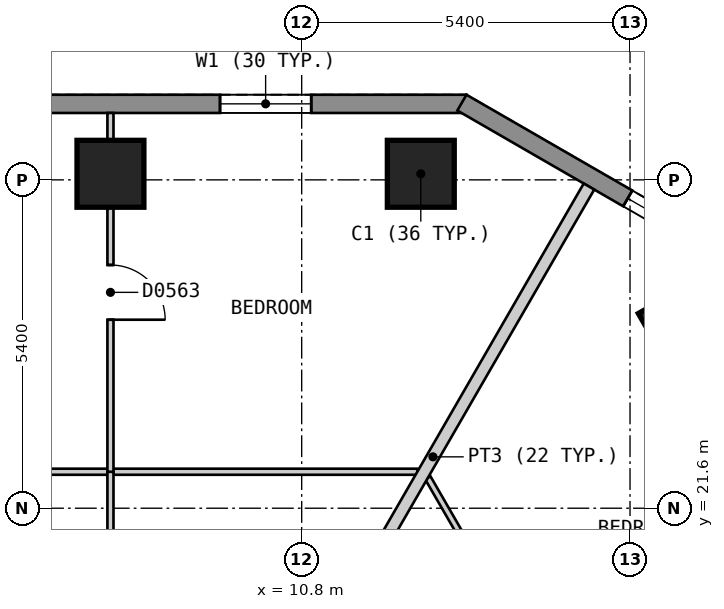
"""IFC4 building model, lengths in metres.
Left out: names, types, materials, properties, quantities, classifications, styles, units other than length and angle.
Written with IfcOpenShell. Run it as: python <this file> out.ifc"""

import sys

from ifc_helpers import new_model, si_unit, direction, frame, frame_2d, origin, origin_2d, place, context, subcontext, project, spatial, polyline, rectangle, outline, extrude, element, fill, save


model = new_model("IFC4")
c1 = context("Model", 3, precision=1e-05, world=origin(), true_north=direction((0.0, 1.0)))
c2 = subcontext(c1, "Body", "Model", "MODEL_VIEW")
j1 = project(units=[si_unit("LENGTHUNIT", "METRE"), si_unit("PLANEANGLEUNIT", "RADIAN")], contexts=[c1])
p1 = place(None, origin())
s1 = spatial("IfcSite", under=j1, at=p1, CompositionType="ELEMENT")
p2 = place(p1, origin())
s2 = spatial("IfcBuilding", under=s1, at=p2, CompositionType="ELEMENT")
p3 = place(p2, frame((0.0, 0.0, 44.4)))
s3 = spatial("IfcBuildingStorey", under=s2, at=p3, CompositionType="ELEMENT", Elevation=44.4)
for number, where, z_axis, x_axis in (
    (1, (12.759, 27.1, 0.0), (0.0, 0.0, 1.0), (-1.0, 0.0, 0.0)),
    (2, (7.655, 27.1, 0.0), (0.0, 0.0, 1.0), (-1.0, 0.0, 0.0)),
    (3, (17.089, 24.601, 0.0), (0.0, 0.0, 1.0), (-0.5, 0.866, 0.0)),
):
    element("IfcColumn", number, at=place(p3, frame(where, z_axis=z_axis, x_axis=x_axis)), inside=s3, PredefinedType="COLUMN", context=c2, shape_type="SweptSolid", body=[
        extrude(rectangle(XDim=1.1, YDim=1.1, at=origin_2d()), origin(), (0.0, 0.0, 1.0), 3.0),
    ])
p4 = place(p3, frame((13.51, 28.25, 0.0), z_axis=(0.0, 0.0, 1.0), x_axis=(-1.0, 0.0, 0.0)))
e4 = element("IfcWall", 4, at=p4, inside=s3, PredefinedType="SOLIDWALL", context=c2, shape_type="SweptSolid", body=[
    extrude(outline(polyline([(0.0, -0.15), (27.02, -0.15), (26.94, 0.15), (0.08, 0.15), (0.0, -0.15)])), origin(), (0.0, 0.0, 1.0), 2.7),
])
p5 = place(p4, frame((2.553, 0.0, 0.15)))
e5 = element("IfcOpeningElement", 5, at=p5, cuts=e4, PredefinedType="OPENING", context=c2, shape_type="SweptSolid", body=[
    extrude(rectangle(XDim=1.5, YDim=2.1, at=frame_2d((0.75, 1.05))), frame((0.0, 0.16, 0.0), z_axis=(0.0, -1.0, 0.0), x_axis=(1.0, 0.0, 0.0)), (0.0, 0.0, 1.0), 0.32),
])
p6 = place(p4, frame((7.657, 0.0, 0.15)))
e6 = element("IfcOpeningElement", 6, at=p6, cuts=e4, PredefinedType="OPENING", context=c2, shape_type="SweptSolid", body=[
    extrude(rectangle(XDim=1.5, YDim=2.1, at=frame_2d((0.75, 1.05))), frame((0.0, 0.16, 0.0), z_axis=(0.0, -1.0, 0.0), x_axis=(1.0, 0.0, 0.0)), (0.0, 0.0, 1.0), 0.32),
])
p7 = place(p4, frame((12.761, 0.0, 0.15)))
e7 = element("IfcOpeningElement", 7, at=p7, cuts=e4, PredefinedType="OPENING", context=c2, shape_type="SweptSolid", body=[
    extrude(rectangle(XDim=1.5, YDim=2.1, at=frame_2d((0.75, 1.05))), frame((0.0, 0.16, 0.0), z_axis=(0.0, -1.0, 0.0), x_axis=(1.0, 0.0, 0.0)), (0.0, 0.0, 1.0), 0.32),
])
p8 = place(p4, frame((17.865, 0.0, 0.15)))
e8 = element("IfcOpeningElement", 8, at=p8, cuts=e4, PredefinedType="OPENING", context=c2, shape_type="SweptSolid", body=[
    extrude(rectangle(XDim=1.5, YDim=2.1, at=frame_2d((0.75, 1.05))), frame((0.0, 0.16, 0.0), z_axis=(0.0, -1.0, 0.0), x_axis=(1.0, 0.0, 0.0)), (0.0, 0.0, 1.0), 0.32),
])
p9 = place(p4, frame((22.969, 0.0, 0.15)))
e9 = element("IfcOpeningElement", 9, at=p9, cuts=e4, PredefinedType="OPENING", context=c2, shape_type="SweptSolid", body=[
    extrude(rectangle(XDim=1.5, YDim=2.1, at=frame_2d((0.75, 1.05))), frame((0.0, 0.16, 0.0), z_axis=(0.0, -1.0, 0.0), x_axis=(1.0, 0.0, 0.0)), (0.0, 0.0, 1.0), 0.32),
])
p10 = place(p3, frame((17.765, 25.77, 0.0), z_axis=(0.0, 0.0, 1.0), x_axis=(-0.866010750942, 0.50002537861, 0.0)))
e10 = element("IfcWall", 10, at=p10, inside=s3, PredefinedType="SOLIDWALL", context=c2, shape_type="SweptSolid", body=[
    extrude(outline(polyline([(0.0, -0.15), (5.0, -0.15), (4.919, 0.15), (0.08, 0.15), (0.0, -0.15)])), origin(), (0.0, 0.0, 1.0), 2.7),
])
p11 = place(p10, frame((0.65, 0.0, 0.15)))
e11 = element("IfcOpeningElement", 11, at=p11, cuts=e10, PredefinedType="OPENING", context=c2, shape_type="SweptSolid", body=[
    extrude(rectangle(XDim=1.2, YDim=2.1, at=frame_2d((0.6, 1.05))), frame((0.0, 0.16, 0.0), z_axis=(0.0, -1.0, 0.0), x_axis=(1.0, 0.0, 0.0)), (0.0, 0.0, 1.0), 0.32),
])
p12 = place(p3, frame((12.875, 22.1, 0.0), z_axis=(0.0, 0.0, 1.0), x_axis=(0.499994897061, -0.866028349948, 0.0)))
e12 = element("IfcWall", 12, at=p12, inside=s3, PredefinedType="PARTITIONING", context=c2, shape_type="SweptSolid", body=[
    extrude(rectangle(XDim=15.152, YDim=0.1, at=frame_2d((7.576, 0.0))), origin(), (0.0, 0.0, 1.0), 2.7),
])
p13 = place(p12, frame((7.146, 0.0, 0.0)))
e13 = element("IfcOpeningElement", 13, at=p13, cuts=e12, PredefinedType="OPENING", context=c2, shape_type="SweptSolid", body=[
    extrude(rectangle(XDim=0.9, YDim=2.1, at=frame_2d((0.45, 1.05))), frame((0.0, 0.06, 0.0), z_axis=(0.0, -1.0, 0.0), x_axis=(1.0, 0.0, 0.0)), (0.0, 0.0, 1.0), 0.12),
])
p14 = place(p3, frame((-2.453, 22.2, 0.0), z_axis=(0.0, 0.0, 1.0), x_axis=(1.0, 0.0, 0.0)))
e14 = element("IfcWall", 14, at=p14, inside=s3, PredefinedType="PARTITIONING", context=c2, shape_type="SweptSolid", body=[
    extrude(rectangle(XDim=15.155, YDim=0.1, at=frame_2d((7.577, 0.0))), origin(), (0.0, 0.0, 1.0), 2.7),
])
p15 = place(p14, frame((7.106, 0.0, 0.0)))
e15 = element("IfcOpeningElement", 15, at=p15, cuts=e14, PredefinedType="OPENING", context=c2, shape_type="SweptSolid", body=[
    extrude(rectangle(XDim=0.9, YDim=2.1, at=frame_2d((0.45, 1.05))), frame((0.0, 0.06, 0.0), z_axis=(0.0, -1.0, 0.0), x_axis=(1.0, 0.0, 0.0)), (0.0, 0.0, 1.0), 0.12),
])
p16 = place(p3, frame((7.655, 18.1, 0.0), z_axis=(0.0, 0.0, 1.0), x_axis=(0.0, 1.0, 0.0)))
e16 = element("IfcWall", 16, at=p16, inside=s3, PredefinedType="PARTITIONING", context=c2, shape_type="SweptSolid", body=[
    extrude(rectangle(XDim=4.1, YDim=0.1, at=frame_2d((2.05, 0.0))), origin(), (0.0, 0.0, 1.0), 2.7),
])
p17 = place(p16, frame((1.6, 0.0, 0.0)))
e17 = element("IfcOpeningElement", 17, at=p17, cuts=e16, PredefinedType="OPENING", context=c2, shape_type="SweptSolid", body=[
    extrude(rectangle(XDim=0.8, YDim=2.1, at=frame_2d((0.4, 1.05))), frame((0.0, 0.06, 0.0), z_axis=(0.0, -1.0, 0.0), x_axis=(1.0, 0.0, 0.0)), (0.0, 0.0, 1.0), 0.12),
])
p18 = place(p3, frame((10.393, 18.0, 0.0), z_axis=(0.0, 0.0, 1.0), x_axis=(0.499945497007, 0.866056868816, 0.0)))
e18 = element("IfcWall", 18, at=p18, inside=s3, PredefinedType="PARTITIONING", context=c2, shape_type="SweptSolid", body=[
    extrude(rectangle(XDim=10.265, YDim=0.2, at=frame_2d((5.132, 0.0))), origin(), (0.0, 0.0, 1.0), 2.7),
])
p19 = place(p3, frame((7.655, 22.2, 0.0), z_axis=(0.0, 0.0, 1.0), x_axis=(0.0, 1.0, 0.0)))
e19 = element("IfcWall", 19, at=p19, inside=s3, PredefinedType="PARTITIONING", context=c2, shape_type="SweptSolid", body=[
    extrude(rectangle(XDim=5.9, YDim=0.1, at=frame_2d((2.95, 0.0))), origin(), (0.0, 0.0, 1.0), 2.7),
])
p20 = place(p19, frame((2.5, 0.0, 0.0)))
e20 = element("IfcOpeningElement", 20, at=p20, cuts=e19, PredefinedType="OPENING", context=c2, shape_type="SweptSolid", body=[
    extrude(rectangle(XDim=0.9, YDim=2.1, at=frame_2d((0.45, 1.05))), frame((0.0, 0.06, 0.0), z_axis=(0.0, -1.0, 0.0), x_axis=(1.0, 0.0, 0.0)), (0.0, 0.0, 1.0), 0.12),
])
p21 = place(p5, origin())
e21 = element("IfcWindow", 21, at=p21, inside=s3, PartitioningType="SINGLE_PANEL", PredefinedType="WINDOW", context=c2, shape_type="SweptSolid", body=[
    extrude(rectangle(XDim=1.5, YDim=2.1, at=frame_2d((0.75, 1.05))), frame((0.0, 0.03, 0.0), z_axis=(0.0, -1.0, 0.0), x_axis=(1.0, 0.0, 0.0)), (0.0, 0.0, 1.0), 0.06),
])
fill(e5, e21)
p22 = place(p11, origin())
e22 = element("IfcWindow", 22, at=p22, inside=s3, PartitioningType="SINGLE_PANEL", PredefinedType="WINDOW", context=c2, shape_type="SweptSolid", body=[
    extrude(rectangle(XDim=1.2, YDim=2.1, at=frame_2d((0.6, 1.05))), frame((0.0, 0.03, 0.0), z_axis=(0.0, -1.0, 0.0), x_axis=(1.0, 0.0, 0.0)), (0.0, 0.0, 1.0), 0.06),
])
fill(e11, e22)
p23 = place(p20, origin())
e23 = element("IfcDoor", 23, at=p23, inside=s3, OperationType="SINGLE_SWING_LEFT", PredefinedType="DOOR", context=c2, shape_type="SweptSolid", body=[
    extrude(rectangle(XDim=0.9, YDim=2.1, at=frame_2d((0.45, 1.05))), frame((0.0, 0.025, 0.0), z_axis=(0.0, -1.0, 0.0), x_axis=(1.0, 0.0, 0.0)), (0.0, 0.0, 1.0), 0.05),
])
fill(e20, e23)
save(model, sys.argv[1])
